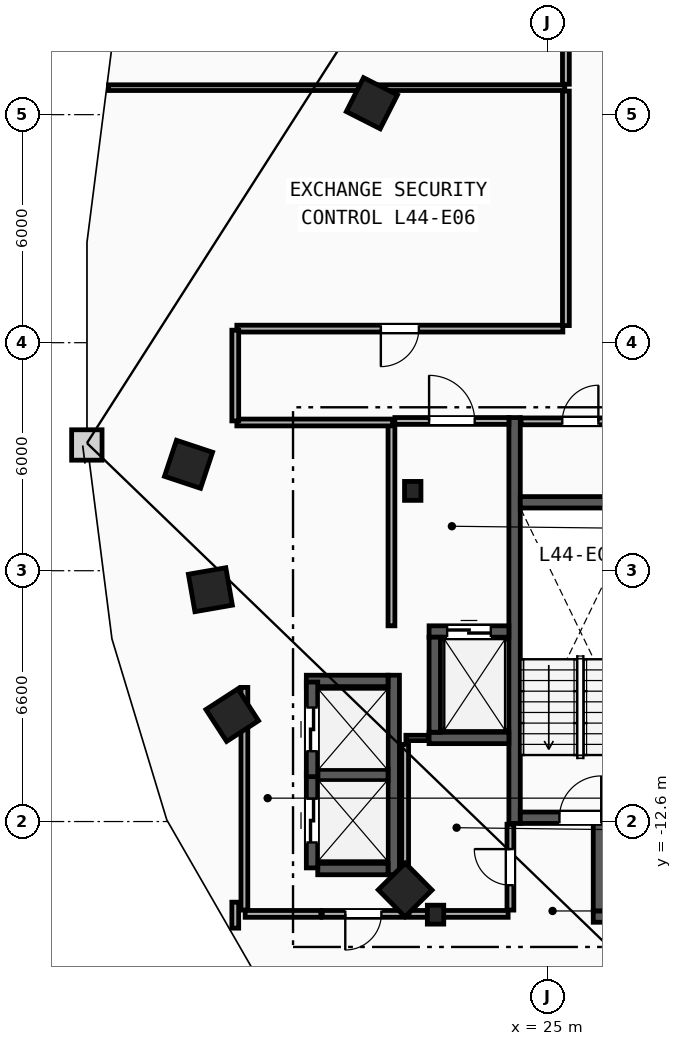
"""IFC4 building model, lengths in metres.
Left out: names, types, materials, properties, quantities, classifications, styles, units other than length and angle.
Written with IfcOpenShell. Run it as: python <this file> out.ifc"""

import sys

from ifc_helpers import new_model, si_unit, direction, frame, frame_2d, origin, origin_2d, place, context, subcontext, project, spatial, rectangle, i_section, extrude, element, fill, save


model = new_model("IFC4")
c1 = context("Model", 3, precision=1e-05, world=origin(), true_north=direction((0.0, 1.0)))
c2 = subcontext(c1, "Body", "Model", "MODEL_VIEW")
j1 = project(units=[si_unit("LENGTHUNIT", "METRE"), si_unit("PLANEANGLEUNIT", "RADIAN")], contexts=[c1])
p1 = place(None, origin())
s1 = spatial("IfcSite", under=j1, at=p1, CompositionType="ELEMENT")
p2 = place(p1, origin())
s2 = spatial("IfcBuilding", under=s1, at=p2, CompositionType="ELEMENT")
p3 = place(p2, frame((0.0, 0.0, 169.2)))
s3 = spatial("IfcBuildingStorey", under=s2, at=p3, CompositionType="ELEMENT", Elevation=169.2)
for number, where, z_axis, x_axis in (
    (1, (21.45, -3.9, 0.0), (0.0, 0.0, 1.0), (1.0, 0.0, 0.0)),
    (2, (22.05, -15.05, 0.0), (0.0, 0.0, 1.0), (1.0, 0.0, 0.0)),
):
    element("IfcColumn", number, at=place(p3, frame(where, z_axis=z_axis, x_axis=x_axis)), inside=s3, PredefinedType="COLUMN", context=c2, shape_type="SweptSolid", body=[
        extrude(i_section(OverallWidth=0.432, OverallDepth=0.498, WebThickness=0.056, FlangeThickness=0.089, FilletRadius=0.018, at=origin_2d()), origin(), (0.0, 0.0, 1.0), 3.6),
    ])
for number, where, z_axis, x_axis in (
    (3, (15.55, -3.2, 0.0), (0.0, 0.0, 1.0), (-0.315, -0.949, 0.0)),
    (4, (16.125, -6.5, 0.0), (0.0, 0.0, 1.0), (0.172, -0.985, 0.0)),
    (5, (16.7, -9.8, 0.0), (0.0, 0.0, 1.0), (0.544, -0.839, 0.0)),
    (6, (21.25, -14.4, 0.0), (0.0, 0.0, 1.0), (0.703, -0.711, 0.0)),
    (7, (20.375, 6.3, 0.0), (0.0, 0.0, 1.0), (-0.453, -0.892, 0.0)),
):
    element("IfcColumn", number, at=place(p3, frame(where, z_axis=z_axis, x_axis=x_axis)), inside=s3, PredefinedType="COLUMN", context=c2, shape_type="SweptSolid", body=[
        extrude(rectangle(XDim=1.0, YDim=1.0, at=origin_2d()), origin(), (0.0, 0.0, 1.0), 3.6),
    ])
p4 = place(p3, frame((24.13, -12.65, 0.0), z_axis=(0.0, 0.0, 1.0), x_axis=(0.0, 1.0, 0.0)))
e8 = element("IfcWall", 8, at=p4, inside=s3, PredefinedType="SHEAR", context=c2, shape_type="SweptSolid", body=[
    extrude(rectangle(XDim=10.68, YDim=0.3, at=frame_2d((5.34, 0.0))), origin(), (0.0, 0.0, 1.0), 3.36),
])
p5 = place(p3, frame((24.28, -12.5, 0.0), z_axis=(0.0, 0.0, 1.0), x_axis=(1.0, 0.0, 0.0)))
e9 = element("IfcWall", 9, at=p5, inside=s3, PredefinedType="SHEAR", context=c2, shape_type="SweptSolid", body=[
    extrude(rectangle(XDim=3.16, YDim=0.3, at=frame_2d((1.58, 0.0))), origin(), (0.0, 0.0, 1.0), 3.36),
])
p6 = place(p5, frame((1.03, 0.0, 0.0)))
e10 = element("IfcOpeningElement", 10, at=p6, cuts=e9, PredefinedType="OPENING", context=c2, shape_type="SweptSolid", body=[
    extrude(rectangle(XDim=1.1, YDim=2.15, at=frame_2d((0.55, 1.075))), frame((0.0, 0.16, 0.0), z_axis=(0.0, -1.0, 0.0), x_axis=(1.0, 0.0, 0.0)), (0.0, 0.0, 1.0), 0.32),
])
p7 = place(p3, frame((24.28, -4.2, 0.0), z_axis=(0.0, 0.0, 1.0), x_axis=(1.0, 0.0, 0.0)))
e11 = element("IfcWall", 11, at=p7, inside=s3, PredefinedType="SHEAR", context=c2, shape_type="SweptSolid", body=[
    extrude(rectangle(XDim=3.16, YDim=0.3, at=frame_2d((1.58, 0.0))), origin(), (0.0, 0.0, 1.0), 3.36),
])
p8 = place(p3, frame((20.89, -7.45, 0.0), z_axis=(0.0, 0.0, 1.0), x_axis=(0.0, 1.0, 0.0)))
e12 = element("IfcWall", 12, at=p8, inside=s3, PredefinedType="PARTITIONING", context=c2, shape_type="SweptSolid", body=[
    extrude(rectangle(XDim=5.3, YDim=0.18, at=frame_2d((2.65, 0.0))), origin(), (0.0, 0.0, 1.0), 3.36),
])
p9 = place(p3, frame((20.98, -2.06, 0.0), z_axis=(0.0, 0.0, 1.0), x_axis=(1.0, 0.0, 0.0)))
e13 = element("IfcWall", 13, at=p9, inside=s3, PredefinedType="PARTITIONING", context=c2, shape_type="SweptSolid", body=[
    extrude(rectangle(XDim=3.0, YDim=0.18, at=frame_2d((1.5, 0.0))), origin(), (0.0, 0.0, 1.0), 3.36),
])
p10 = place(p9, frame((0.9, 0.0, 0.0)))
e14 = element("IfcOpeningElement", 14, at=p10, cuts=e13, PredefinedType="OPENING", context=c2, shape_type="SweptSolid", body=[
    extrude(rectangle(XDim=1.2, YDim=2.15, at=frame_2d((0.6, 1.075))), frame((0.0, 0.1, 0.0), z_axis=(0.0, -1.0, 0.0), x_axis=(1.0, 0.0, 0.0)), (0.0, 0.0, 1.0), 0.2),
])
p11 = place(p3, frame((21.88, -7.6, 0.0), z_axis=(0.0, 0.0, 1.0), x_axis=(1.0, 0.0, 0.0)))
e15 = element("IfcWall", 15, at=p11, inside=s3, PredefinedType="SHEAR", context=c2, shape_type="SweptSolid", body=[
    extrude(rectangle(XDim=2.1, YDim=0.3, at=frame_2d((1.05, 0.0))), origin(), (0.0, 0.0, 1.0), 3.36),
])
p12 = place(p11, frame((0.475, 0.0, 0.0)))
e16 = element("IfcOpeningElement", 16, at=p12, cuts=e15, PredefinedType="OPENING", context=c2, shape_type="SweptSolid", body=[
    extrude(rectangle(XDim=1.15, YDim=2.2, at=frame_2d((0.575, 1.1))), frame((0.0, 0.16, 0.0), z_axis=(0.0, -1.0, 0.0), x_axis=(1.0, 0.0, 0.0)), (0.0, 0.0, 1.0), 0.32),
])
p13 = place(p3, frame((21.88, -10.4, 0.0), z_axis=(0.0, 0.0, 1.0), x_axis=(1.0, 0.0, 0.0)))
e17 = element("IfcWall", 17, at=p13, inside=s3, PredefinedType="SHEAR", context=c2, shape_type="SweptSolid", body=[
    extrude(rectangle(XDim=2.1, YDim=0.3, at=frame_2d((1.05, 0.0))), origin(), (0.0, 0.0, 1.0), 3.36),
])
for number, where, z_axis, x_axis in (
    (18, (22.03, -10.25, 0.0), (0.0, 0.0, 1.0), (0.0, 1.0, 0.0)),
    (19, (26.2, -15.1, 0.0), (0.0, 0.0, 1.0), (1.0, 0.0, 0.0)),
):
    element("IfcWall", number, at=place(p3, frame(where, z_axis=z_axis, x_axis=x_axis)), inside=s3, PredefinedType="SHEAR", context=c2, shape_type="SweptSolid", body=[
        extrude(rectangle(XDim=2.5, YDim=0.3, at=frame_2d((1.25, 0.0))), origin(), (0.0, 0.0, 1.0), 3.36),
    ])
p14 = place(p3, frame((26.35, -14.95, 0.0), z_axis=(0.0, 0.0, 1.0), x_axis=(0.0, 1.0, 0.0)))
e20 = element("IfcWall", 20, at=p14, inside=s3, PredefinedType="SHEAR", context=c2, shape_type="SweptSolid", body=[
    extrude(rectangle(XDim=2.3, YDim=0.3, at=frame_2d((1.15, 0.0))), origin(), (0.0, 0.0, 1.0), 3.36),
])
p15 = place(p3, frame((20.95, -14.0, 0.0), z_axis=(0.0, 0.0, 1.0), x_axis=(0.0, 1.0, 0.0)))
e21 = element("IfcWall", 21, at=p15, inside=s3, PredefinedType="SHEAR", context=c2, shape_type="SweptSolid", body=[
    extrude(rectangle(XDim=5.25, YDim=0.3, at=frame_2d((2.625, 0.0))), origin(), (0.0, 0.0, 1.0), 3.36),
])
p16 = place(p3, frame((18.95, -13.85, 0.0), z_axis=(0.0, 0.0, 1.0), x_axis=(1.0, 0.0, 0.0)))
e22 = element("IfcWall", 22, at=p16, inside=s3, PredefinedType="SHEAR", context=c2, shape_type="SweptSolid", body=[
    extrude(rectangle(XDim=1.85, YDim=0.3, at=frame_2d((0.925, 0.0))), origin(), (0.0, 0.0, 1.0), 3.36),
])
p17 = place(p3, frame((18.65, -8.9, 0.0), z_axis=(0.0, 0.0, 1.0), x_axis=(1.0, 0.0, 0.0)))
e23 = element("IfcWall", 23, at=p17, inside=s3, PredefinedType="SHEAR", context=c2, shape_type="SweptSolid", body=[
    extrude(rectangle(XDim=2.15, YDim=0.3, at=frame_2d((1.075, 0.0))), origin(), (0.0, 0.0, 1.0), 3.36),
])
p18 = place(p3, frame((18.95, -11.375, 0.0), z_axis=(0.0, 0.0, 1.0), x_axis=(1.0, 0.0, 0.0)))
e24 = element("IfcWall", 24, at=p18, inside=s3, PredefinedType="SHEAR", context=c2, shape_type="SweptSolid", body=[
    extrude(rectangle(XDim=1.85, YDim=0.3, at=frame_2d((0.925, 0.0))), origin(), (0.0, 0.0, 1.0), 3.36),
])
p19 = place(p3, frame((18.8, -13.82, 0.0), z_axis=(0.0, 0.0, 1.0), x_axis=(0.0, 1.0, 0.0)))
e25 = element("IfcWall", 25, at=p19, inside=s3, PredefinedType="SHEAR", context=c2, shape_type="SweptSolid", body=[
    extrude(rectangle(XDim=2.49, YDim=0.3, at=frame_2d((1.245, 0.0))), origin(), (0.0, 0.0, 1.0), 3.36),
])
p20 = place(p19, frame((0.67, 0.0, 0.0)))
e26 = element("IfcOpeningElement", 26, at=p20, cuts=e25, PredefinedType="OPENING", context=c2, shape_type="SweptSolid", body=[
    extrude(rectangle(XDim=1.15, YDim=2.2, at=frame_2d((0.575, 1.1))), frame((0.0, 0.16, 0.0), z_axis=(0.0, -1.0, 0.0), x_axis=(1.0, 0.0, 0.0)), (0.0, 0.0, 1.0), 0.32),
])
p21 = place(p3, frame((18.8, -11.42, 0.0), z_axis=(0.0, 0.0, 1.0), x_axis=(0.0, 1.0, 0.0)))
e27 = element("IfcWall", 27, at=p21, inside=s3, PredefinedType="SHEAR", context=c2, shape_type="SweptSolid", body=[
    extrude(rectangle(XDim=2.49, YDim=0.3, at=frame_2d((1.245, 0.0))), origin(), (0.0, 0.0, 1.0), 3.36),
])
p22 = place(p21, frame((0.67, 0.0, 0.0)))
e28 = element("IfcOpeningElement", 28, at=p22, cuts=e27, PredefinedType="OPENING", context=c2, shape_type="SweptSolid", body=[
    extrude(rectangle(XDim=1.15, YDim=2.2, at=frame_2d((0.575, 1.1))), frame((0.0, 0.16, 0.0), z_axis=(0.0, -1.0, 0.0), x_axis=(1.0, 0.0, 0.0)), (0.0, 0.0, 1.0), 0.32),
])
p23 = place(p3, frame((17.02, -14.93, 0.0), z_axis=(0.0, 0.0, 1.0), x_axis=(0.0, 1.0, 0.0)))
e29 = element("IfcWall", 29, at=p23, inside=s3, PredefinedType="PARTITIONING", context=c2, shape_type="SweptSolid", body=[
    extrude(rectangle(XDim=5.86, YDim=0.18, at=frame_2d((2.93, 0.0))), origin(), (0.0, 0.0, 1.0), 3.36),
])
p24 = place(p3, frame((17.04, -15.03, 0.0), z_axis=(0.0, 0.0, 1.0), x_axis=(1.0, 0.0, 0.0)))
e30 = element("IfcWall", 30, at=p24, inside=s3, PredefinedType="PARTITIONING", context=c2, shape_type="SweptSolid", body=[
    extrude(rectangle(XDim=1.99, YDim=0.18, at=frame_2d((0.995, 0.0))), origin(), (0.0, 0.0, 1.0), 3.36),
])
p25 = place(p3, frame((21.23, -15.03, 0.0), z_axis=(0.0, 0.0, 1.0), x_axis=(-1.0, 0.0, 0.0)))
e31 = element("IfcWall", 31, at=p25, inside=s3, PredefinedType="PARTITIONING", context=c2, shape_type="SweptSolid", body=[
    extrude(rectangle(XDim=2.16, YDim=0.18, at=frame_2d((1.08, 0.0))), origin(), (0.0, 0.0, 1.0), 3.36),
])
p26 = place(p25, frame((0.605, 0.0, 0.0)))
e32 = element("IfcOpeningElement", 32, at=p26, cuts=e31, PredefinedType="OPENING", context=c2, shape_type="SweptSolid", body=[
    extrude(rectangle(XDim=0.95, YDim=2.1, at=frame_2d((0.475, 1.05))), frame((0.0, 0.1, 0.0), z_axis=(0.0, -1.0, 0.0), x_axis=(1.0, 0.0, 0.0)), (0.0, 0.0, 1.0), 0.2),
])
p27 = place(p3, frame((21.27, -10.4, 0.0), z_axis=(0.0, 0.0, 1.0), x_axis=(1.0, 0.0, 0.0)))
e33 = element("IfcWall", 33, at=p27, inside=s3, PredefinedType="PARTITIONING", context=c2, shape_type="SweptSolid", body=[
    extrude(rectangle(XDim=0.59, YDim=0.14, at=frame_2d((0.295, 0.0))), origin(), (0.0, 0.0, 1.0), 3.36),
])
p28 = place(p3, frame((21.25, -14.93, 0.0), z_axis=(0.0, 0.0, 1.0), x_axis=(0.0, 1.0, 0.0)))
e34 = element("IfcWall", 34, at=p28, inside=s3, PredefinedType="PARTITIONING", context=c2, shape_type="SweptSolid", body=[
    extrude(rectangle(XDim=4.36, YDim=0.18, at=frame_2d((2.18, 0.0))), origin(), (0.0, 0.0, 1.0), 3.36),
])
p29 = place(p3, frame((21.35, -15.03, 0.0), z_axis=(0.0, 0.0, 1.0), x_axis=(1.0, 0.0, 0.0)))
e35 = element("IfcWall", 35, at=p29, inside=s3, PredefinedType="PARTITIONING", context=c2, shape_type="SweptSolid", body=[
    extrude(rectangle(XDim=2.61, YDim=0.18, at=frame_2d((1.305, 0.0))), origin(), (0.0, 0.0, 1.0), 2.433),
])
p30 = place(p3, frame((24.3, -2.07, 0.0), z_axis=(0.0, 0.0, 1.0), x_axis=(1.0, 0.0, 0.0)))
e36 = element("IfcWall", 36, at=p30, inside=s3, PredefinedType="PARTITIONING", context=c2, shape_type="SweptSolid", body=[
    extrude(rectangle(XDim=3.12, YDim=0.18, at=frame_2d((1.56, 0.0))), origin(), (0.0, 0.0, 1.0), 3.36),
])
p31 = place(p30, frame((1.085, 0.0, 0.0)))
e37 = element("IfcOpeningElement", 37, at=p31, cuts=e36, PredefinedType="OPENING", context=c2, shape_type="SweptSolid", body=[
    extrude(rectangle(XDim=0.95, YDim=2.1, at=frame_2d((0.475, 1.05))), frame((0.0, 0.1, 0.0), z_axis=(0.0, -1.0, 0.0), x_axis=(1.0, 0.0, 0.0)), (0.0, 0.0, 1.0), 0.2),
])
p32 = place(p3, frame((24.02, -14.93, 0.0), z_axis=(0.0, 0.0, 1.0), x_axis=(0.0, 1.0, 0.0)))
e38 = element("IfcWall", 38, at=p32, inside=s3, PredefinedType="PARTITIONING", context=c2, shape_type="SweptSolid", body=[
    extrude(rectangle(XDim=2.26, YDim=0.18, at=frame_2d((1.13, 0.0))), origin(), (0.0, 0.0, 1.0), 3.36),
])
p33 = place(p32, frame((0.655, 0.0, 0.0)))
e39 = element("IfcOpeningElement", 39, at=p33, cuts=e38, PredefinedType="OPENING", context=c2, shape_type="SweptSolid", body=[
    extrude(rectangle(XDim=0.95, YDim=2.1, at=frame_2d((0.475, 1.05))), frame((0.0, 0.1, 0.0), z_axis=(0.0, -1.0, 0.0), x_axis=(1.0, 0.0, 0.0)), (0.0, 0.0, 1.0), 0.2),
])
p34 = place(p3, frame((13.447, 6.71, 0.0), z_axis=(0.0, 0.0, 1.0), x_axis=(1.0, 0.0, 0.0)))
e40 = element("IfcWall", 40, at=p34, inside=s3, PredefinedType="PARTITIONING", context=c2, shape_type="SweptSolid", body=[
    extrude(rectangle(XDim=12.003, YDim=0.15, at=frame_2d((6.001, 0.0))), origin(), (0.0, 0.0, 1.0), 3.36),
])
p35 = place(p3, frame((25.4, 0.37, 0.0), z_axis=(0.0, 0.0, 1.0), x_axis=(-1.0, 0.0, 0.0)))
e41 = element("IfcWall", 41, at=p35, inside=s3, PredefinedType="PARTITIONING", context=c2, shape_type="SweptSolid", body=[
    extrude(rectangle(XDim=8.578, YDim=0.18, at=frame_2d((4.289, 0.0))), origin(), (0.0, 0.0, 1.0), 3.36),
])
p36 = place(p35, frame((3.789, 0.0, 0.0)))
e42 = element("IfcOpeningElement", 42, at=p36, cuts=e41, PredefinedType="OPENING", context=c2, shape_type="SweptSolid", body=[
    extrude(rectangle(XDim=1.0, YDim=2.15, at=frame_2d((0.5, 1.075))), frame((0.0, 0.1, 0.0), z_axis=(0.0, -1.0, 0.0), x_axis=(1.0, 0.0, 0.0)), (0.0, 0.0, 1.0), 0.2),
])
p37 = place(p3, frame((25.48, 6.62, 0.0), z_axis=(0.0, 0.0, 1.0), x_axis=(0.0, -1.0, 0.0)))
e43 = element("IfcWall", 43, at=p37, inside=s3, PredefinedType="PARTITIONING", context=c2, shape_type="SweptSolid", body=[
    extrude(rectangle(XDim=6.17, YDim=0.18, at=frame_2d((3.085, 0.0))), origin(), (0.0, 0.0, 1.0), 3.36),
])
p38 = place(p3, frame((16.822, -2.1, 0.0), z_axis=(0.0, 0.0, 1.0), x_axis=(1.0, 0.0, 0.0)))
e44 = element("IfcWall", 44, at=p38, inside=s3, PredefinedType="PARTITIONING", context=c2, shape_type="SweptSolid", body=[
    extrude(rectangle(XDim=4.098, YDim=0.18, at=frame_2d((2.049, 0.0))), origin(), (0.0, 0.0, 1.0), 3.36),
])
p39 = place(p3, frame((16.78, 0.329, 0.0), z_axis=(0.0, 0.0, 1.0), x_axis=(0.0, -1.0, 0.0)))
e45 = element("IfcWall", 45, at=p39, inside=s3, PredefinedType="PARTITIONING", context=c2, shape_type="SweptSolid", body=[
    extrude(rectangle(XDim=2.387, YDim=0.18, at=frame_2d((1.194, 0.0))), origin(), (0.0, 0.0, 1.0), 3.36),
])
p40 = place(p3, frame((16.78, -14.721, 0.0), z_axis=(0.0, 0.0, 1.0), x_axis=(0.0, -1.0, 0.0)))
e46 = element("IfcWall", 46, at=p40, inside=s3, PredefinedType="PARTITIONING", context=c2, shape_type="SweptSolid", body=[
    extrude(rectangle(XDim=0.684, YDim=0.18, at=frame_2d((0.342, 0.0))), origin(), (0.0, 0.0, 1.0), 3.36),
])
p41 = place(p3, frame((25.48, 11.178, 0.0), z_axis=(0.0, 0.0, 1.0), x_axis=(0.0, -1.0, 0.0)))
e47 = element("IfcWall", 47, at=p41, inside=s3, PredefinedType="PARTITIONING", context=c2, shape_type="SweptSolid", body=[
    extrude(rectangle(XDim=4.378, YDim=0.18, at=frame_2d((2.189, 0.0))), origin(), (0.0, 0.0, 1.0), 3.36),
])
p42 = place(p41, frame((1.689, 0.0, 0.0)))
e48 = element("IfcOpeningElement", 48, at=p42, cuts=e47, PredefinedType="OPENING", context=c2, shape_type="SweptSolid", body=[
    extrude(rectangle(XDim=1.0, YDim=2.15, at=frame_2d((0.5, 1.075))), frame((0.0, 0.1, 0.0), z_axis=(0.0, -1.0, 0.0), x_axis=(1.0, 0.0, 0.0)), (0.0, 0.0, 1.0), 0.2),
])
p43 = place(p6, origin())
e49 = element("IfcDoor", 49, at=p43, inside=s3, OperationType="SINGLE_SWING_RIGHT", PredefinedType="DOOR", context=c2, shape_type="SweptSolid", body=[
    extrude(rectangle(XDim=1.1, YDim=2.15, at=frame_2d((0.55, 1.075))), frame((0.0, 0.025, 0.0), z_axis=(0.0, -1.0, 0.0), x_axis=(1.0, 0.0, 0.0)), (0.0, 0.0, 1.0), 0.05),
])
fill(e10, e49)
p44 = place(p10, origin())
e50 = element("IfcDoor", 50, at=p44, inside=s3, OperationType="SINGLE_SWING_LEFT", PredefinedType="DOOR", context=c2, shape_type="SweptSolid", body=[
    extrude(rectangle(XDim=1.2, YDim=2.15, at=frame_2d((0.6, 1.075))), frame((0.0, 0.025, 0.0), z_axis=(0.0, -1.0, 0.0), x_axis=(1.0, 0.0, 0.0)), (0.0, 0.0, 1.0), 0.05),
])
fill(e14, e50)
p45 = place(p12, origin())
e51 = element("IfcDoor", 51, at=p45, inside=s3, OperationType="SLIDING_TO_LEFT", PredefinedType="TRAPDOOR", context=c2, shape_type="SweptSolid", body=[
    extrude(rectangle(XDim=1.15, YDim=2.2, at=frame_2d((0.575, 1.1))), frame((0.0, 0.025, 0.0), z_axis=(0.0, -1.0, 0.0), x_axis=(1.0, 0.0, 0.0)), (0.0, 0.0, 1.0), 0.05),
])
fill(e16, e51)
p46 = place(p20, origin())
e52 = element("IfcDoor", 52, at=p46, inside=s3, OperationType="SLIDING_TO_LEFT", PredefinedType="TRAPDOOR", context=c2, shape_type="SweptSolid", body=[
    extrude(rectangle(XDim=1.15, YDim=2.2, at=frame_2d((0.575, 1.1))), frame((0.0, 0.025, 0.0), z_axis=(0.0, -1.0, 0.0), x_axis=(1.0, 0.0, 0.0)), (0.0, 0.0, 1.0), 0.05),
])
fill(e26, e52)
p47 = place(p22, origin())
e53 = element("IfcDoor", 53, at=p47, inside=s3, OperationType="SLIDING_TO_LEFT", PredefinedType="TRAPDOOR", context=c2, shape_type="SweptSolid", body=[
    extrude(rectangle(XDim=1.15, YDim=2.2, at=frame_2d((0.575, 1.1))), frame((0.0, 0.025, 0.0), z_axis=(0.0, -1.0, 0.0), x_axis=(1.0, 0.0, 0.0)), (0.0, 0.0, 1.0), 0.05),
])
fill(e28, e53)
p48 = place(p36, origin())
e54 = element("IfcDoor", 54, at=p48, inside=s3, OperationType="SINGLE_SWING_RIGHT", PredefinedType="DOOR", context=c2, shape_type="SweptSolid", body=[
    extrude(rectangle(XDim=1.0, YDim=2.15, at=frame_2d((0.5, 1.075))), frame((0.0, 0.025, 0.0), z_axis=(0.0, -1.0, 0.0), x_axis=(1.0, 0.0, 0.0)), (0.0, 0.0, 1.0), 0.05),
])
fill(e42, e54)
p49 = place(p31, origin())
e55 = element("IfcDoor", 55, at=p49, inside=s3, OperationType="SINGLE_SWING_RIGHT", PredefinedType="DOOR", context=c2, shape_type="SweptSolid", body=[
    extrude(rectangle(XDim=0.95, YDim=2.1, at=frame_2d((0.475, 1.05))), frame((0.0, 0.025, 0.0), z_axis=(0.0, -1.0, 0.0), x_axis=(1.0, 0.0, 0.0)), (0.0, 0.0, 1.0), 0.05),
])
fill(e37, e55)
p50 = place(p33, origin())
e56 = element("IfcDoor", 56, at=p50, inside=s3, OperationType="SINGLE_SWING_RIGHT", PredefinedType="DOOR", context=c2, shape_type="SweptSolid", body=[
    extrude(rectangle(XDim=0.95, YDim=2.1, at=frame_2d((0.475, 1.05))), frame((0.0, 0.025, 0.0), z_axis=(0.0, -1.0, 0.0), x_axis=(1.0, 0.0, 0.0)), (0.0, 0.0, 1.0), 0.05),
])
fill(e39, e56)
p51 = place(p26, origin())
e57 = element("IfcDoor", 57, at=p51, inside=s3, OperationType="SINGLE_SWING_RIGHT", PredefinedType="DOOR", context=c2, shape_type="SweptSolid", body=[
    extrude(rectangle(XDim=0.95, YDim=2.1, at=frame_2d((0.475, 1.05))), frame((0.0, 0.025, 0.0), z_axis=(0.0, -1.0, 0.0), x_axis=(1.0, 0.0, 0.0)), (0.0, 0.0, 1.0), 0.05),
])
fill(e32, e57)
save(model, sys.argv[1])
